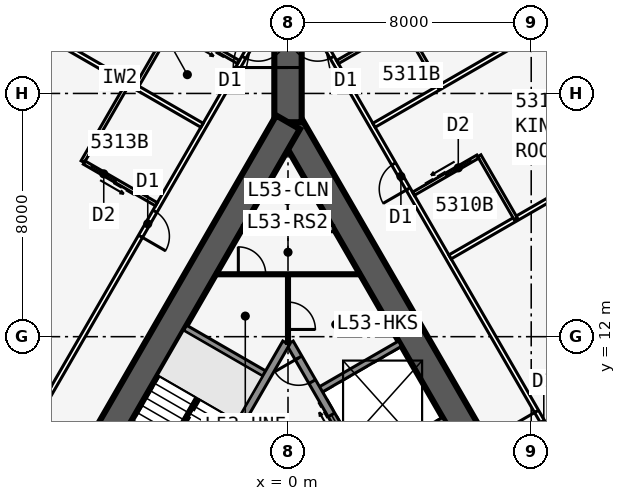
"""IFC4 building model, lengths in metres.
Left out: names, types, materials, properties, quantities, classifications, styles, units other than length and angle.
Written with IfcOpenShell. Run it as: python <this file> out.ifc"""

import sys

from ifc_helpers import new_model, si_unit, direction, frame, frame_2d, origin, place, context, subcontext, project, spatial, rectangle, extrude, element, fill, save


model = new_model("IFC4")
c1 = context("Model", 3, precision=1e-05, world=origin(), true_north=direction((0.0, 1.0)))
c2 = subcontext(c1, "Body", "Model", "MODEL_VIEW")
j1 = project(units=[si_unit("LENGTHUNIT", "METRE"), si_unit("PLANEANGLEUNIT", "RADIAN")], contexts=[c1])
p1 = place(None, origin())
s1 = spatial("IfcSite", under=j1, at=p1, CompositionType="ELEMENT")
p2 = place(p1, origin())
s2 = spatial("IfcBuilding", under=s1, at=p2, CompositionType="ELEMENT")
p3 = place(p2, frame((0.0, 0.0, 200.9)))
s3 = spatial("IfcBuildingStorey", under=s2, at=p3, CompositionType="ELEMENT", Elevation=200.9)
p4 = place(p3, frame((16.5, -9.526, 0.0), z_axis=(0.0, 0.0, 1.0), x_axis=(-0.499999749417, 0.866025548458, 0.0)))
e1 = element("IfcWall", 1, at=p4, inside=s3, PredefinedType="SHEAR", context=c2, shape_type="SweptSolid", body=[
    extrude(rectangle(XDim=33.0, YDim=0.9, at=frame_2d((16.5, 0.0))), origin(), (0.0, 0.0, 1.0), 3.6),
])
p5 = place(p4, frame((14.15, 0.0, 0.0)))
e2 = element("IfcOpeningElement", 2, at=p5, cuts=e1, PredefinedType="OPENING", context=c2, shape_type="SweptSolid", body=[
    extrude(rectangle(XDim=1.8, YDim=2.13, at=frame_2d((0.9, 1.065))), frame((0.0, 0.46, 0.0), z_axis=(0.0, -1.0, 0.0), x_axis=(1.0, 0.0, 0.0)), (0.0, 0.0, 1.0), 0.92),
])
p6 = place(p4, frame((12.6, 0.0, 0.0)))
e3 = element("IfcOpeningElement", 3, at=p6, cuts=e1, PredefinedType="OPENING", context=c2, shape_type="SweptSolid", body=[
    extrude(rectangle(XDim=1.0, YDim=2.13, at=frame_2d((0.5, 1.065))), frame((0.0, 0.46, 0.0), z_axis=(0.0, -1.0, 0.0), x_axis=(1.0, 0.0, 0.0)), (0.0, 0.0, 1.0), 0.92),
])
p7 = place(p3, frame((5.379, 2.586, 0.0), z_axis=(0.0, 0.0, 1.0), x_axis=(-0.500001375892, 0.866024609411, 0.0)))
e4 = element("IfcWall", 4, at=p7, inside=s3, PredefinedType="SOLIDWALL", context=c2, shape_type="SweptSolid", body=[
    extrude(rectangle(XDim=10.633, YDim=0.25, at=frame_2d((5.316, 0.0))), origin(), (0.0, 0.0, 1.0), 3.435),
])
p8 = place(p7, frame((9.164, 0.0, 0.0)))
e5 = element("IfcOpeningElement", 5, at=p8, cuts=e4, PredefinedType="OPENING", context=c2, shape_type="SweptSolid", body=[
    extrude(rectangle(XDim=0.9, YDim=2.13, at=frame_2d((0.45, 1.065))), frame((0.0, 0.135, 0.0), z_axis=(0.0, -1.0, 0.0), x_axis=(1.0, 0.0, 0.0)), (0.0, 0.0, 1.0), 0.27),
])
p9 = place(p7, frame((1.0, 0.0, 0.0)))
e6 = element("IfcOpeningElement", 6, at=p9, cuts=e4, PredefinedType="OPENING", context=c2, shape_type="SweptSolid", body=[
    extrude(rectangle(XDim=1.1, YDim=2.13, at=frame_2d((0.55, 1.065))), frame((0.0, 0.135, 0.0), z_axis=(0.0, -1.0, 0.0), x_axis=(1.0, 0.0, 0.0)), (0.0, 0.0, 1.0), 0.27),
])
p10 = place(p7, frame((3.9, 0.0, 0.0)))
e7 = element("IfcOpeningElement", 7, at=p10, cuts=e4, PredefinedType="OPENING", context=c2, shape_type="SweptSolid", body=[
    extrude(rectangle(XDim=1.1, YDim=2.13, at=frame_2d((0.55, 1.065))), frame((0.0, 0.135, 0.0), z_axis=(0.0, -1.0, 0.0), x_axis=(1.0, 0.0, 0.0)), (0.0, 0.0, 1.0), 0.27),
])
p11 = place(p7, frame((6.8, 0.0, 0.0)))
e8 = element("IfcOpeningElement", 8, at=p11, cuts=e4, PredefinedType="OPENING", context=c2, shape_type="SweptSolid", body=[
    extrude(rectangle(XDim=1.1, YDim=2.13, at=frame_2d((0.55, 1.065))), frame((0.0, 0.135, 0.0), z_axis=(0.0, -1.0, 0.0), x_axis=(1.0, 0.0, 0.0)), (0.0, 0.0, 1.0), 0.27),
])
for number, where, z_axis, x_axis in (
    (9, (2.429, 7.696, 0.0), (0.0, 0.0, 1.0), (0.866, 0.5, 0.0)),
    (10, (0.979, 10.207, 0.0), (0.0, 0.0, 1.0), (0.866, 0.5, 0.0)),
):
    element("IfcWall", number, at=place(p3, frame(where, z_axis=z_axis, x_axis=x_axis)), inside=s3, PredefinedType="SOLIDWALL", context=c2, shape_type="SweptSolid", body=[
        extrude(rectangle(XDim=3.125, YDim=0.2, at=frame_2d((1.562, 0.0))), origin(), (0.0, 0.0, 1.0), 3.435),
    ])
p12 = place(p3, frame((0.0, 19.052, 0.0), z_axis=(0.0, 0.0, 1.0), x_axis=(-0.499999749417, -0.866025548458, 0.0)))
e11 = element("IfcWall", 11, at=p12, inside=s3, PredefinedType="SHEAR", context=c2, shape_type="SweptSolid", body=[
    extrude(rectangle(XDim=33.0, YDim=0.9, at=frame_2d((16.5, 0.0))), origin(), (0.0, 0.0, 1.0), 3.6),
])
p13 = place(p12, frame((14.15, 0.0, 0.0)))
e12 = element("IfcOpeningElement", 12, at=p13, cuts=e11, PredefinedType="OPENING", context=c2, shape_type="SweptSolid", body=[
    extrude(rectangle(XDim=1.8, YDim=2.13, at=frame_2d((0.9, 1.065))), frame((0.0, 0.46, 0.0), z_axis=(0.0, -1.0, 0.0), x_axis=(1.0, 0.0, 0.0)), (0.0, 0.0, 1.0), 0.92),
])
p14 = place(p12, frame((12.6, 0.0, 0.0)))
e13 = element("IfcOpeningElement", 13, at=p14, cuts=e11, PredefinedType="OPENING", context=c2, shape_type="SweptSolid", body=[
    extrude(rectangle(XDim=1.0, YDim=2.13, at=frame_2d((0.5, 1.065))), frame((0.0, 0.46, 0.0), z_axis=(0.0, -1.0, 0.0), x_axis=(1.0, 0.0, 0.0)), (0.0, 0.0, 1.0), 0.92),
])
p15 = place(p3, frame((-0.062, 11.794, 0.0), z_axis=(0.0, 0.0, 1.0), x_axis=(-0.500006680225, -0.86602154692, 0.0)))
e14 = element("IfcWall", 14, at=p15, inside=s3, PredefinedType="SOLIDWALL", context=c2, shape_type="SweptSolid", body=[
    extrude(rectangle(XDim=7.733, YDim=0.25, at=frame_2d((3.866, 0.0))), origin(), (0.0, 0.0, 1.0), 3.435),
])
p16 = place(p3, frame((-0.679, 10.727, 0.0), z_axis=(0.0, 0.0, 1.0), x_axis=(-0.866022959057, 0.500004234368, 0.0)))
e15 = element("IfcWall", 15, at=p16, inside=s3, PredefinedType="SOLIDWALL", context=c2, shape_type="SweptSolid", body=[
    extrude(rectangle(XDim=3.125, YDim=0.2, at=frame_2d((1.562, 0.0))), origin(), (0.0, 0.0, 1.0), 3.435),
])
p17 = place(p3, frame((0.0, 19.052, 0.0), z_axis=(0.0, 0.0, 1.0), x_axis=(0.0, 1.0, 0.0)))
e16 = element("IfcWall", 16, at=p17, inside=s3, PredefinedType="SHEAR", context=c2, shape_type="SweptSolid", body=[
    extrude(rectangle(XDim=4.746, YDim=0.9, at=frame_2d((2.373, 0.0))), origin(), (0.0, 0.0, 1.0), 3.6),
])
p18 = place(p17, frame((1.8, 0.0, 0.0)))
e17 = element("IfcOpeningElement", 17, at=p18, cuts=e16, PredefinedType="OPENING", context=c2, shape_type="SweptSolid", body=[
    extrude(rectangle(XDim=1.8, YDim=2.13, at=frame_2d((0.9, 1.065))), frame((0.0, 0.46, 0.0), z_axis=(0.0, -1.0, 0.0), x_axis=(1.0, 0.0, 0.0)), (0.0, 0.0, 1.0), 0.92),
])
p19 = place(p3, frame((11.754, 18.304, 0.0), z_axis=(0.0, 0.0, 1.0), x_axis=(-0.664348996191, 0.747422511876, 0.0)))
e18 = element("IfcWall", 18, at=p19, inside=s3, PredefinedType="STANDARD", context=c2, shape_type="SweptSolid", body=[
    extrude(rectangle(XDim=5.105, YDim=0.25, at=frame_2d((2.552, 0.0))), origin(), (0.0, 0.0, 1.0), 3.435),
])
p20 = place(p19, frame((0.752, 0.0, 0.45)))
e19 = element("IfcOpeningElement", 19, at=p20, cuts=e18, PredefinedType="OPENING", context=c2, shape_type="SweptSolid", body=[
    extrude(rectangle(XDim=3.6, YDim=2.6, at=frame_2d((1.8, 1.3))), frame((0.0, 0.135, 0.0), z_axis=(0.0, -1.0, 0.0), x_axis=(1.0, 0.0, 0.0)), (0.0, 0.0, 1.0), 0.27),
])
p21 = place(p3, frame((20.027, -10.985, 0.0), z_axis=(0.0, 0.0, 1.0), x_axis=(-0.500001677587, 0.866024435227, 0.0)))
e20 = element("IfcWall", 20, at=p21, inside=s3, PredefinedType="PARTITIONING", context=c2, shape_type="SweptSolid", body=[
    extrude(rectangle(XDim=39.054, YDim=0.15, at=frame_2d((19.527, 0.0))), origin(), (0.0, 0.0, 1.0), 3.435),
])
p22 = place(p21, frame((1.558, 0.0, 0.0)))
e21 = element("IfcOpeningElement", 21, at=p22, cuts=e20, PredefinedType="OPENING", context=c2, shape_type="SweptSolid", body=[
    extrude(rectangle(XDim=0.95, YDim=2.13, at=frame_2d((0.475, 1.065))), frame((0.0, 0.085, 0.0), z_axis=(0.0, -1.0, 0.0), x_axis=(1.0, 0.0, 0.0)), (0.0, 0.0, 1.0), 0.17),
])
p23 = place(p21, frame((12.752, 0.0, 0.0)))
e22 = element("IfcOpeningElement", 22, at=p23, cuts=e20, PredefinedType="OPENING", context=c2, shape_type="SweptSolid", body=[
    extrude(rectangle(XDim=0.95, YDim=2.13, at=frame_2d((0.475, 1.065))), frame((0.0, 0.085, 0.0), z_axis=(0.0, -1.0, 0.0), x_axis=(1.0, 0.0, 0.0)), (0.0, 0.0, 1.0), 0.17),
])
p24 = place(p21, frame((17.152, 0.0, 0.0)))
e23 = element("IfcOpeningElement", 23, at=p24, cuts=e20, PredefinedType="OPENING", context=c2, shape_type="SweptSolid", body=[
    extrude(rectangle(XDim=0.95, YDim=2.13, at=frame_2d((0.475, 1.065))), frame((0.0, 0.085, 0.0), z_axis=(0.0, -1.0, 0.0), x_axis=(1.0, 0.0, 0.0)), (0.0, 0.0, 1.0), 0.17),
])
p25 = place(p21, frame((22.752, 0.0, 0.0)))
e24 = element("IfcOpeningElement", 24, at=p25, cuts=e20, PredefinedType="OPENING", context=c2, shape_type="SweptSolid", body=[
    extrude(rectangle(XDim=0.95, YDim=2.13, at=frame_2d((0.475, 1.065))), frame((0.0, 0.085, 0.0), z_axis=(0.0, -1.0, 0.0), x_axis=(1.0, 0.0, 0.0)), (0.0, 0.0, 1.0), 0.17),
])
p26 = place(p21, frame((32.152, 0.0, 0.0)))
e25 = element("IfcOpeningElement", 25, at=p26, cuts=e20, PredefinedType="OPENING", context=c2, shape_type="SweptSolid", body=[
    extrude(rectangle(XDim=0.95, YDim=2.13, at=frame_2d((0.475, 1.065))), frame((0.0, 0.085, 0.0), z_axis=(0.0, -1.0, 0.0), x_axis=(1.0, 0.0, 0.0)), (0.0, 0.0, 1.0), 0.17),
])
p27 = place(p21, frame((37.152, 0.0, 0.0)))
e26 = element("IfcOpeningElement", 26, at=p27, cuts=e20, PredefinedType="OPENING", context=c2, shape_type="SweptSolid", body=[
    extrude(rectangle(XDim=0.95, YDim=2.13, at=frame_2d((0.475, 1.065))), frame((0.0, 0.085, 0.0), z_axis=(0.0, -1.0, 0.0), x_axis=(1.0, 0.0, 0.0)), (0.0, 0.0, 1.0), 0.17),
])
p28 = place(p3, frame((5.329, 14.623, 0.0), z_axis=(0.0, 0.0, 1.0), x_axis=(0.866017877653, 0.500013035415, 0.0)))
e27 = element("IfcWall", 27, at=p28, inside=s3, PredefinedType="PARTITIONING", context=c2, shape_type="SweptSolid", body=[
    extrude(rectangle(XDim=7.273, YDim=0.15, at=frame_2d((3.636, 0.0))), origin(), (0.0, 0.0, 1.0), 2.589),
])
p29 = place(p3, frame((2.829, 18.954, 0.0), z_axis=(0.0, 0.0, 1.0), x_axis=(0.866026604282, 0.499997920671, 0.0)))
e28 = element("IfcWall", 28, at=p29, inside=s3, PredefinedType="PARTITIONING", context=c2, shape_type="SweptSolid", body=[
    extrude(rectangle(XDim=6.24, YDim=0.15, at=frame_2d((3.12, 0.0))), origin(), (0.0, 0.0, 1.0), 2.589),
])
p30 = place(p3, frame((7.493, 15.873, 0.0), z_axis=(0.0, 0.0, 1.0), x_axis=(-0.499957262057, 0.866050077142, 0.0)))
e29 = element("IfcWall", 29, at=p30, inside=s3, PredefinedType="PLUMBINGWALL", context=c2, shape_type="SweptSolid", body=[
    extrude(rectangle(XDim=2.4, YDim=0.12, at=frame_2d((1.2, 0.0))), origin(), (0.0, 0.0, 1.0), 3.435),
])
p31 = place(p3, frame((4.128, 16.702, 0.0), z_axis=(0.0, 0.0, 1.0), x_axis=(0.866048967903, 0.499959183527, 0.0)))
e30 = element("IfcWall", 30, at=p31, inside=s3, PredefinedType="PLUMBINGWALL", context=c2, shape_type="SweptSolid", body=[
    extrude(rectangle(XDim=2.44, YDim=0.12, at=frame_2d((1.22, 0.0))), origin(), (0.0, 0.0, 1.0), 3.435),
])
p32 = place(p31, frame((1.25, 0.0, 0.0)))
e31 = element("IfcOpeningElement", 31, at=p32, cuts=e30, PredefinedType="OPENING", context=c2, shape_type="SweptSolid", body=[
    extrude(rectangle(XDim=0.9, YDim=2.13, at=frame_2d((0.45, 1.065))), frame((0.0, 0.07, 0.0), z_axis=(0.0, -1.0, 0.0), x_axis=(1.0, 0.0, 0.0)), (0.0, 0.0, 1.0), 0.14),
])
p33 = place(p3, frame((4.993, 20.204, 0.0), z_axis=(0.0, 0.0, 1.0), x_axis=(-0.500001309137, 0.866024647952, 0.0)))
e32 = element("IfcWall", 32, at=p33, inside=s3, PredefinedType="PLUMBINGWALL", context=c2, shape_type="SweptSolid", body=[
    extrude(rectangle(XDim=2.4, YDim=0.12, at=frame_2d((1.2, 0.0))), origin(), (0.0, 0.0, 1.0), 3.435),
])
p34 = place(p3, frame((1.628, 21.032, 0.0), z_axis=(0.0, 0.0, 1.0), x_axis=(0.866048967903, 0.499959183527, 0.0)))
e33 = element("IfcWall", 33, at=p34, inside=s3, PredefinedType="PLUMBINGWALL", context=c2, shape_type="SweptSolid", body=[
    extrude(rectangle(XDim=2.44, YDim=0.12, at=frame_2d((1.22, 0.0))), origin(), (0.0, 0.0, 1.0), 3.435),
])
p35 = place(p34, frame((1.25, 0.0, 0.0)))
e34 = element("IfcOpeningElement", 34, at=p35, cuts=e33, PredefinedType="OPENING", context=c2, shape_type="SweptSolid", body=[
    extrude(rectangle(XDim=0.9, YDim=2.13, at=frame_2d((0.45, 1.065))), frame((0.0, 0.07, 0.0), z_axis=(0.0, -1.0, 0.0), x_axis=(1.0, 0.0, 0.0)), (0.0, 0.0, 1.0), 0.14),
])
p36 = place(p3, frame((-0.5, 22.836, 0.0), z_axis=(0.0, 0.0, 1.0), x_axis=(-0.500001677587, -0.866024435227, 0.0)))
e35 = element("IfcWall", 35, at=p36, inside=s3, PredefinedType="PARTITIONING", context=c2, shape_type="SweptSolid", body=[
    extrude(rectangle(XDim=39.054, YDim=0.15, at=frame_2d((19.527, 0.0))), origin(), (0.0, 0.0, 1.0), 3.435),
])
p37 = place(p36, frame((0.952, 0.0, 0.0)))
e36 = element("IfcOpeningElement", 36, at=p37, cuts=e35, PredefinedType="OPENING", context=c2, shape_type="SweptSolid", body=[
    extrude(rectangle(XDim=0.95, YDim=2.13, at=frame_2d((0.475, 1.065))), frame((0.0, 0.085, 0.0), z_axis=(0.0, -1.0, 0.0), x_axis=(1.0, 0.0, 0.0)), (0.0, 0.0, 1.0), 0.17),
])
p38 = place(p36, frame((7.752, 0.0, 0.0)))
e37 = element("IfcOpeningElement", 37, at=p38, cuts=e35, PredefinedType="OPENING", context=c2, shape_type="SweptSolid", body=[
    extrude(rectangle(XDim=0.95, YDim=2.13, at=frame_2d((0.475, 1.065))), frame((0.0, 0.085, 0.0), z_axis=(0.0, -1.0, 0.0), x_axis=(1.0, 0.0, 0.0)), (0.0, 0.0, 1.0), 0.17),
])
p39 = place(p36, frame((17.152, 0.0, 0.0)))
e38 = element("IfcOpeningElement", 38, at=p39, cuts=e35, PredefinedType="OPENING", context=c2, shape_type="SweptSolid", body=[
    extrude(rectangle(XDim=0.95, YDim=2.13, at=frame_2d((0.475, 1.065))), frame((0.0, 0.085, 0.0), z_axis=(0.0, -1.0, 0.0), x_axis=(1.0, 0.0, 0.0)), (0.0, 0.0, 1.0), 0.17),
])
p40 = place(p36, frame((26.552, 0.0, 0.0)))
e39 = element("IfcOpeningElement", 39, at=p40, cuts=e35, PredefinedType="OPENING", context=c2, shape_type="SweptSolid", body=[
    extrude(rectangle(XDim=0.95, YDim=2.13, at=frame_2d((0.475, 1.065))), frame((0.0, 0.085, 0.0), z_axis=(0.0, -1.0, 0.0), x_axis=(1.0, 0.0, 0.0)), (0.0, 0.0, 1.0), 0.17),
])
p41 = place(p36, frame((37.152, 0.0, 0.0)))
e40 = element("IfcOpeningElement", 40, at=p41, cuts=e35, PredefinedType="OPENING", context=c2, shape_type="SweptSolid", body=[
    extrude(rectangle(XDim=0.95, YDim=2.13, at=frame_2d((0.475, 1.065))), frame((0.0, 0.085, 0.0), z_axis=(0.0, -1.0, 0.0), x_axis=(1.0, 0.0, 0.0)), (0.0, 0.0, 1.0), 0.17),
])
p42 = place(p3, frame((-2.829, 18.954, 0.0), z_axis=(0.0, 0.0, 1.0), x_axis=(-0.866026604282, 0.499997920671, 0.0)))
e41 = element("IfcWall", 41, at=p42, inside=s3, PredefinedType="PARTITIONING", context=c2, shape_type="SweptSolid", body=[
    extrude(rectangle(XDim=6.24, YDim=0.15, at=frame_2d((3.12, 0.0))), origin(), (0.0, 0.0, 1.0), 2.589),
])
p43 = place(p3, frame((-3.793, 22.282, 0.0), z_axis=(0.0, 0.0, 1.0), x_axis=(-0.500001309137, -0.866024647952, 0.0)))
e42 = element("IfcWall", 42, at=p43, inside=s3, PredefinedType="PLUMBINGWALL", context=c2, shape_type="SweptSolid", body=[
    extrude(rectangle(XDim=2.4, YDim=0.12, at=frame_2d((1.2, 0.0))), origin(), (0.0, 0.0, 1.0), 3.435),
])
p44 = place(p3, frame((-1.628, 21.032, 0.0), z_axis=(0.0, 0.0, 1.0), x_axis=(-0.866048967903, 0.499959183527, 0.0)))
e43 = element("IfcWall", 43, at=p44, inside=s3, PredefinedType="PLUMBINGWALL", context=c2, shape_type="SweptSolid", body=[
    extrude(rectangle(XDim=2.44, YDim=0.12, at=frame_2d((1.22, 0.0))), origin(), (0.0, 0.0, 1.0), 3.435),
])
p45 = place(p44, frame((1.25, 0.0, 0.0)))
e44 = element("IfcOpeningElement", 44, at=p45, cuts=e43, PredefinedType="OPENING", context=c2, shape_type="SweptSolid", body=[
    extrude(rectangle(XDim=0.9, YDim=2.13, at=frame_2d((0.45, 1.065))), frame((0.0, 0.07, 0.0), z_axis=(0.0, -1.0, 0.0), x_axis=(1.0, 0.0, 0.0)), (0.0, 0.0, 1.0), 0.14),
])
p46 = place(p3, frame((-5.253, 20.354, 0.0), z_axis=(0.0, 0.0, 1.0), x_axis=(-0.499990139034, -0.866031096941, 0.0)))
e45 = element("IfcWall", 45, at=p46, inside=s3, PredefinedType="PLUMBINGWALL", context=c2, shape_type="SweptSolid", body=[
    extrude(rectangle(XDim=3.0, YDim=0.12, at=frame_2d((1.5, 0.0))), origin(), (0.0, 0.0, 1.0), 3.435),
])
p47 = place(p3, frame((-4.329, 16.355, 0.0), z_axis=(0.0, 0.0, 1.0), x_axis=(-0.866035715982, 0.499982138324, 0.0)))
e46 = element("IfcWall", 46, at=p47, inside=s3, PredefinedType="PLUMBINGWALL", context=c2, shape_type="SweptSolid", body=[
    extrude(rectangle(XDim=2.74, YDim=0.12, at=frame_2d((1.37, 0.0))), origin(), (0.0, 0.0, 1.0), 3.435),
])
p48 = place(p47, frame((1.55, 0.0, 0.0)))
e47 = element("IfcOpeningElement", 47, at=p48, cuts=e46, PredefinedType="OPENING", context=c2, shape_type="SweptSolid", body=[
    extrude(rectangle(XDim=0.9, YDim=2.13, at=frame_2d((0.45, 1.065))), frame((0.0, 0.07, 0.0), z_axis=(0.0, -1.0, 0.0), x_axis=(1.0, 0.0, 0.0)), (0.0, 0.0, 1.0), 0.14),
])
p49 = place(p3, frame((-1.501, 15.552, 0.0), z_axis=(0.0, 0.0, 1.0), x_axis=(1.0, 0.0, 0.0)))
e48 = element("IfcWall", 48, at=p49, inside=s3, PredefinedType="SOLIDWALL", context=c2, shape_type="SweptSolid", body=[
    extrude(rectangle(XDim=3.002, YDim=0.2, at=frame_2d((1.501, 0.0))), origin(), (0.0, 0.0, 1.0), 3.435),
])
p50 = place(p3, frame((-2.367, 14.052, 0.0), z_axis=(0.0, 0.0, 1.0), x_axis=(1.0, 0.0, 0.0)))
e49 = element("IfcWall", 49, at=p50, inside=s3, PredefinedType="PARTITIONING", context=c2, shape_type="SweptSolid", body=[
    extrude(rectangle(XDim=4.734, YDim=0.1, at=frame_2d((2.367, 0.0))), origin(), (0.0, 0.0, 1.0), 3.435),
])
p51 = place(p50, frame((0.734, 0.0, 0.0)))
e50 = element("IfcOpeningElement", 50, at=p51, cuts=e49, PredefinedType="OPENING", context=c2, shape_type="SweptSolid", body=[
    extrude(rectangle(XDim=0.9, YDim=2.13, at=frame_2d((0.45, 1.065))), frame((0.0, 0.06, 0.0), z_axis=(0.0, -1.0, 0.0), x_axis=(1.0, 0.0, 0.0)), (0.0, 0.0, 1.0), 0.12),
])
p52 = place(p3, frame((0.0, 14.052, 0.0), z_axis=(0.0, 0.0, 1.0), x_axis=(0.0, -1.0, 0.0)))
e51 = element("IfcWall", 51, at=p52, inside=s3, PredefinedType="PARTITIONING", context=c2, shape_type="SweptSolid", body=[
    extrude(rectangle(XDim=2.275, YDim=0.1, at=frame_2d((1.138, 0.0))), origin(), (0.0, 0.0, 1.0), 3.435),
])
p53 = place(p52, frame((0.915, 0.0, 0.0)))
e52 = element("IfcOpeningElement", 52, at=p53, cuts=e51, PredefinedType="OPENING", context=c2, shape_type="SweptSolid", body=[
    extrude(rectangle(XDim=0.9, YDim=2.13, at=frame_2d((0.45, 1.065))), frame((0.0, 0.06, 0.0), z_axis=(0.0, -1.0, 0.0), x_axis=(1.0, 0.0, 0.0)), (0.0, 0.0, 1.0), 0.12),
])
p54 = place(p3, frame((-2.988, 9.978, 0.0), z_axis=(0.0, 0.0, 1.0), x_axis=(-0.499992232847, -0.866029888106, 0.0)))
e53 = element("IfcWall", 53, at=p54, inside=s3, PredefinedType="SOLIDWALL", context=c2, shape_type="SweptSolid", body=[
    extrude(rectangle(XDim=2.794, YDim=0.1, at=frame_2d((1.397, 0.0))), origin(), (0.0, 0.0, 1.0), 3.6),
])
p55 = place(p25, origin())
e54 = element("IfcDoor", 54, at=p55, inside=s3, OperationType="SINGLE_SWING_RIGHT", PredefinedType="DOOR", context=c2, shape_type="SweptSolid", body=[
    extrude(rectangle(XDim=0.95, YDim=2.13, at=frame_2d((0.475, 1.065))), frame((0.0, 0.025, 0.0), z_axis=(0.0, -1.0, 0.0), x_axis=(1.0, 0.0, 0.0)), (0.0, 0.0, 1.0), 0.05),
])
fill(e24, e54)
p56 = place(p32, origin())
e55 = element("IfcDoor", 55, at=p56, inside=s3, OperationType="SLIDING_TO_LEFT", PredefinedType="DOOR", context=c2, shape_type="SweptSolid", body=[
    extrude(rectangle(XDim=0.9, YDim=2.13, at=frame_2d((0.45, 1.065))), frame((0.0, 0.025, 0.0), z_axis=(0.0, -1.0, 0.0), x_axis=(1.0, 0.0, 0.0)), (0.0, 0.0, 1.0), 0.05),
])
fill(e31, e55)
p57 = place(p26, origin())
e56 = element("IfcDoor", 56, at=p57, inside=s3, OperationType="SINGLE_SWING_LEFT", PredefinedType="DOOR", context=c2, shape_type="SweptSolid", body=[
    extrude(rectangle(XDim=0.95, YDim=2.13, at=frame_2d((0.475, 1.065))), frame((0.0, 0.025, 0.0), z_axis=(0.0, -1.0, 0.0), x_axis=(1.0, 0.0, 0.0)), (0.0, 0.0, 1.0), 0.05),
])
fill(e25, e56)
p58 = place(p27, origin())
e57 = element("IfcDoor", 57, at=p58, inside=s3, OperationType="SINGLE_SWING_RIGHT", PredefinedType="DOOR", context=c2, shape_type="SweptSolid", body=[
    extrude(rectangle(XDim=0.95, YDim=2.13, at=frame_2d((0.475, 1.065))), frame((0.0, 0.025, 0.0), z_axis=(0.0, -1.0, 0.0), x_axis=(1.0, 0.0, 0.0)), (0.0, 0.0, 1.0), 0.05),
])
fill(e26, e57)
p59 = place(p37, origin())
e58 = element("IfcDoor", 58, at=p59, inside=s3, OperationType="SINGLE_SWING_LEFT", PredefinedType="DOOR", context=c2, shape_type="SweptSolid", body=[
    extrude(rectangle(XDim=0.95, YDim=2.13, at=frame_2d((0.475, 1.065))), frame((0.0, 0.025, 0.0), z_axis=(0.0, -1.0, 0.0), x_axis=(1.0, 0.0, 0.0)), (0.0, 0.0, 1.0), 0.05),
])
fill(e36, e58)
p60 = place(p48, origin())
e59 = element("IfcDoor", 59, at=p60, inside=s3, OperationType="SLIDING_TO_LEFT", PredefinedType="DOOR", context=c2, shape_type="SweptSolid", body=[
    extrude(rectangle(XDim=0.9, YDim=2.13, at=frame_2d((0.45, 1.065))), frame((0.0, 0.025, 0.0), z_axis=(0.0, -1.0, 0.0), x_axis=(1.0, 0.0, 0.0)), (0.0, 0.0, 1.0), 0.05),
])
fill(e47, e59)
p61 = place(p38, origin())
e60 = element("IfcDoor", 60, at=p61, inside=s3, OperationType="SINGLE_SWING_RIGHT", PredefinedType="DOOR", context=c2, shape_type="SweptSolid", body=[
    extrude(rectangle(XDim=0.95, YDim=2.13, at=frame_2d((0.475, 1.065))), frame((0.0, 0.025, 0.0), z_axis=(0.0, -1.0, 0.0), x_axis=(1.0, 0.0, 0.0)), (0.0, 0.0, 1.0), 0.05),
])
fill(e37, e60)
p62 = place(p18, origin())
e61 = element("IfcDoor", 61, at=p62, inside=s3, OperationType="DOUBLE_DOOR_DOUBLE_SWING", PredefinedType="DOOR", context=c2, shape_type="SweptSolid", body=[
    extrude(rectangle(XDim=1.8, YDim=2.13, at=frame_2d((0.9, 1.065))), frame((0.0, 0.025, 0.0), z_axis=(0.0, -1.0, 0.0), x_axis=(1.0, 0.0, 0.0)), (0.0, 0.0, 1.0), 0.05),
])
fill(e17, e61)
p63 = place(p51, origin())
e62 = element("IfcDoor", 62, at=p63, inside=s3, OperationType="SINGLE_SWING_LEFT", PredefinedType="DOOR", context=c2, shape_type="SweptSolid", body=[
    extrude(rectangle(XDim=0.9, YDim=2.13, at=frame_2d((0.45, 1.065))), frame((0.0, 0.025, 0.0), z_axis=(0.0, -1.0, 0.0), x_axis=(1.0, 0.0, 0.0)), (0.0, 0.0, 1.0), 0.05),
])
fill(e50, e62)
p64 = place(p8, origin())
e63 = element("IfcDoor", 63, at=p64, inside=s3, OperationType="SINGLE_SWING_RIGHT", PredefinedType="DOOR", context=c2, shape_type="SweptSolid", body=[
    extrude(rectangle(XDim=0.9, YDim=2.13, at=frame_2d((0.45, 1.065))), frame((0.0, 0.025, 0.0), z_axis=(0.0, -1.0, 0.0), x_axis=(1.0, 0.0, 0.0)), (0.0, 0.0, 1.0), 0.05),
])
fill(e5, e63)
p65 = place(p53, origin())
e64 = element("IfcDoor", 64, at=p65, inside=s3, OperationType="SINGLE_SWING_RIGHT", PredefinedType="DOOR", context=c2, shape_type="SweptSolid", body=[
    extrude(rectangle(XDim=0.9, YDim=2.13, at=frame_2d((0.45, 1.065))), frame((0.0, 0.025, 0.0), z_axis=(0.0, -1.0, 0.0), x_axis=(1.0, 0.0, 0.0)), (0.0, 0.0, 1.0), 0.05),
])
fill(e52, e64)
p66 = place(p11, origin())
e65 = element("IfcDoor", 65, at=p66, inside=s3, OperationType="DOUBLE_DOOR_SLIDING", PredefinedType="USERDEFINED", context=c2, shape_type="SweptSolid", body=[
    extrude(rectangle(XDim=1.1, YDim=2.13, at=frame_2d((0.55, 1.065))), frame((0.0, 0.025, 0.0), z_axis=(0.0, -1.0, 0.0), x_axis=(1.0, 0.0, 0.0)), (0.0, 0.0, 1.0), 0.05),
])
fill(e8, e65)
save(model, sys.argv[1])
